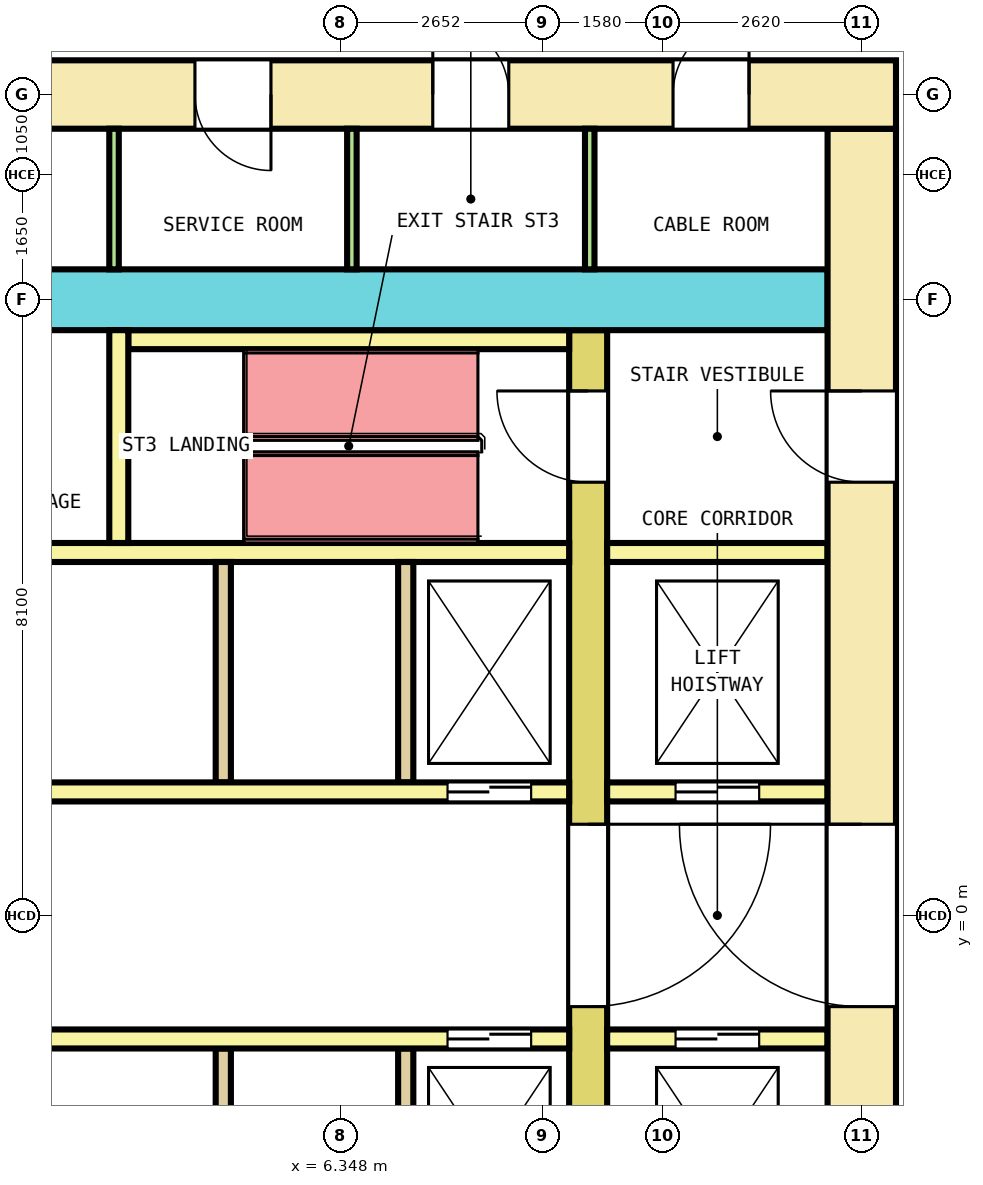
"""IFC4 building model, lengths in metres.
Left out: names, types, materials, properties, quantities, classifications, styles, units other than length and angle.
Written with IfcOpenShell. Run it as: python <this file> out.ifc"""

import sys

from ifc_helpers import new_model, si_unit, direction, frame, frame_2d, origin, place, context, subcontext, project, spatial, rectangle, extrude, element, fill, save


model = new_model("IFC4")
c1 = context("Model", 3, precision=1e-05, world=origin(), true_north=direction((0.0, 1.0)))
c2 = subcontext(c1, "Body", "Model", "MODEL_VIEW")
j1 = project(units=[si_unit("LENGTHUNIT", "METRE"), si_unit("PLANEANGLEUNIT", "RADIAN")], contexts=[c1])
p1 = place(None, origin())
s1 = spatial("IfcSite", under=j1, at=p1, CompositionType="ELEMENT")
p2 = place(p1, origin())
s2 = spatial("IfcBuilding", under=s1, at=p2, CompositionType="ELEMENT")
p3 = place(p2, frame((0.0, 0.0, 63.0)))
s3 = spatial("IfcBuildingStorey", under=s2, at=p3, CompositionType="ELEMENT", Elevation=63.0)
p4 = place(p3, frame((-13.65, 10.8, 0.0), z_axis=(0.0, 0.0, 1.0), x_axis=(1.0, 0.0, 0.0)))
e1 = element("IfcWall", 1, at=p4, inside=s3, PredefinedType="SHEAR", context=c2, shape_type="SweptSolid", body=[
    extrude(rectangle(XDim=27.3, YDim=0.9, at=frame_2d((13.65, 0.0))), origin(), (0.0, 0.0, 1.0), 4.1),
])
p5 = place(p4, frame((2.4, 0.0, 0.0)))
e2 = element("IfcOpeningElement", 2, at=p5, cuts=e1, PredefinedType="OPENING", context=c2, shape_type="SweptSolid", body=[
    extrude(rectangle(XDim=1.0, YDim=2.1, at=frame_2d((0.5, 1.05))), frame((0.0, 0.46, 0.0), z_axis=(0.0, -1.0, 0.0), x_axis=(1.0, 0.0, 0.0)), (0.0, 0.0, 1.0), 0.92),
])
p6 = place(p4, frame((6.494, 0.0, 0.0)))
e3 = element("IfcOpeningElement", 3, at=p6, cuts=e1, PredefinedType="OPENING", context=c2, shape_type="SweptSolid", body=[
    extrude(rectangle(XDim=1.0, YDim=2.1, at=frame_2d((0.5, 1.05))), frame((0.0, 0.46, 0.0), z_axis=(0.0, -1.0, 0.0), x_axis=(1.0, 0.0, 0.0)), (0.0, 0.0, 1.0), 0.92),
])
p7 = place(p4, frame((10.556, 0.0, 0.0)))
e4 = element("IfcOpeningElement", 4, at=p7, cuts=e1, PredefinedType="OPENING", context=c2, shape_type="SweptSolid", body=[
    extrude(rectangle(XDim=1.0, YDim=2.1, at=frame_2d((0.5, 1.05))), frame((0.0, 0.46, 0.0), z_axis=(0.0, -1.0, 0.0), x_axis=(1.0, 0.0, 0.0)), (0.0, 0.0, 1.0), 0.92),
])
p8 = place(p4, frame((18.077, 0.0, 0.0)))
e5 = element("IfcOpeningElement", 5, at=p8, cuts=e1, PredefinedType="OPENING", context=c2, shape_type="SweptSolid", body=[
    extrude(rectangle(XDim=1.0, YDim=2.1, at=frame_2d((0.5, 1.05))), frame((0.0, 0.46, 0.0), z_axis=(0.0, -1.0, 0.0), x_axis=(1.0, 0.0, 0.0)), (0.0, 0.0, 1.0), 0.92),
])
p9 = place(p4, frame((21.206, 0.0, 0.0)))
e6 = element("IfcOpeningElement", 6, at=p9, cuts=e1, PredefinedType="OPENING", context=c2, shape_type="SweptSolid", body=[
    extrude(rectangle(XDim=1.0, YDim=2.1, at=frame_2d((0.5, 1.05))), frame((0.0, 0.46, 0.0), z_axis=(0.0, -1.0, 0.0), x_axis=(1.0, 0.0, 0.0)), (0.0, 0.0, 1.0), 0.92),
])
p10 = place(p4, frame((24.367, 0.0, 0.0)))
e7 = element("IfcOpeningElement", 7, at=p10, cuts=e1, PredefinedType="OPENING", context=c2, shape_type="SweptSolid", body=[
    extrude(rectangle(XDim=1.0, YDim=2.1, at=frame_2d((0.5, 1.05))), frame((0.0, 0.46, 0.0), z_axis=(0.0, -1.0, 0.0), x_axis=(1.0, 0.0, 0.0)), (0.0, 0.0, 1.0), 0.92),
])
p11 = place(p4, frame((14.575, 0.0, 0.0)))
e8 = element("IfcOpeningElement", 8, at=p11, cuts=e1, PredefinedType="OPENING", context=c2, shape_type="SweptSolid", body=[
    extrude(rectangle(XDim=1.4, YDim=2.1, at=frame_2d((0.7, 1.05))), frame((0.0, 0.46, 0.0), z_axis=(0.0, -1.0, 0.0), x_axis=(1.0, 0.0, 0.0)), (0.0, 0.0, 1.0), 0.92),
])
p12 = place(p3, frame((13.2, -10.35, 0.0), z_axis=(0.0, 0.0, 1.0), x_axis=(0.0, 1.0, 0.0)))
e9 = element("IfcWall", 9, at=p12, inside=s3, PredefinedType="SHEAR", context=c2, shape_type="SweptSolid", body=[
    extrude(rectangle(XDim=20.7, YDim=0.9, at=frame_2d((10.35, 0.0))), origin(), (0.0, 0.0, 1.0), 4.1),
])
p13 = place(p12, frame((9.15, 0.0, 0.0)))
e10 = element("IfcOpeningElement", 10, at=p13, cuts=e9, PredefinedType="OPENING", context=c2, shape_type="SweptSolid", body=[
    extrude(rectangle(XDim=2.4, YDim=2.1, at=frame_2d((1.2, 1.05))), frame((0.0, 0.46, 0.0), z_axis=(0.0, -1.0, 0.0), x_axis=(1.0, 0.0, 0.0)), (0.0, 0.0, 1.0), 0.92),
])
p14 = place(p12, frame((16.05, 0.0, 0.0)))
e11 = element("IfcOpeningElement", 11, at=p14, cuts=e9, PredefinedType="OPENING", context=c2, shape_type="SweptSolid", body=[
    extrude(rectangle(XDim=1.2, YDim=2.1, at=frame_2d((0.6, 1.05))), frame((0.0, 0.46, 0.0), z_axis=(0.0, -1.0, 0.0), x_axis=(1.0, 0.0, 0.0)), (0.0, 0.0, 1.0), 0.92),
])
p15 = place(p12, frame((2.819, 0.0, 0.0)))
e12 = element("IfcOpeningElement", 12, at=p15, cuts=e9, PredefinedType="OPENING", context=c2, shape_type="SweptSolid", body=[
    extrude(rectangle(XDim=1.0, YDim=2.1, at=frame_2d((0.5, 1.05))), frame((0.0, 0.46, 0.0), z_axis=(0.0, -1.0, 0.0), x_axis=(1.0, 0.0, 0.0)), (0.0, 0.0, 1.0), 0.92),
])
p16 = place(p12, frame((4.281, 0.0, 0.0)))
e13 = element("IfcOpeningElement", 13, at=p16, cuts=e9, PredefinedType="OPENING", context=c2, shape_type="SweptSolid", body=[
    extrude(rectangle(XDim=1.0, YDim=2.1, at=frame_2d((0.5, 1.05))), frame((0.0, 0.46, 0.0), z_axis=(0.0, -1.0, 0.0), x_axis=(1.0, 0.0, 0.0)), (0.0, 0.0, 1.0), 0.92),
])
p17 = place(p3, frame((-12.75, 8.1, 0.0), z_axis=(0.0, 0.0, 1.0), x_axis=(1.0, 0.0, 0.0)))
e14 = element("IfcWall", 14, at=p17, inside=s3, PredefinedType="SHEAR", context=c2, shape_type="SweptSolid", body=[
    extrude(rectangle(XDim=25.5, YDim=0.8, at=frame_2d((12.75, 0.0))), origin(), (0.0, 0.0, 1.0), 4.1),
])
p18 = place(p17, frame((13.675, 0.0, 0.0)))
e15 = element("IfcOpeningElement", 15, at=p18, cuts=e14, PredefinedType="OPENING", context=c2, shape_type="SweptSolid", body=[
    extrude(rectangle(XDim=1.4, YDim=2.1, at=frame_2d((0.7, 1.05))), frame((0.0, 0.41, 0.0), z_axis=(0.0, -1.0, 0.0), x_axis=(1.0, 0.0, 0.0)), (0.0, 0.0, 1.0), 0.82),
])
p19 = place(p3, frame((9.6, -7.7, 0.0), z_axis=(0.0, 0.0, 1.0), x_axis=(0.0, 1.0, 0.0)))
e16 = element("IfcWall", 16, at=p19, inside=s3, PredefinedType="SHEAR", context=c2, shape_type="SweptSolid", body=[
    extrude(rectangle(XDim=15.4, YDim=0.5, at=frame_2d((7.7, 0.0))), origin(), (0.0, 0.0, 1.0), 4.1),
])
p20 = place(p19, frame((6.5, 0.0, 0.0)))
e17 = element("IfcOpeningElement", 17, at=p20, cuts=e16, PredefinedType="OPENING", context=c2, shape_type="SweptSolid", body=[
    extrude(rectangle(XDim=2.4, YDim=2.1, at=frame_2d((1.2, 1.05))), frame((0.0, 0.26, 0.0), z_axis=(0.0, -1.0, 0.0), x_axis=(1.0, 0.0, 0.0)), (0.0, 0.0, 1.0), 0.52),
])
p21 = place(p19, frame((13.4, 0.0, 0.0)))
e18 = element("IfcOpeningElement", 18, at=p21, cuts=e16, PredefinedType="OPENING", context=c2, shape_type="SweptSolid", body=[
    extrude(rectangle(XDim=1.2, YDim=2.1, at=frame_2d((0.6, 1.05))), frame((0.0, 0.26, 0.0), z_axis=(0.0, -1.0, 0.0), x_axis=(1.0, 0.0, 0.0)), (0.0, 0.0, 1.0), 0.52),
])
p22 = place(p19, frame((0.9, 0.0, 0.0)))
e19 = element("IfcOpeningElement", 19, at=p22, cuts=e16, PredefinedType="OPENING", context=c2, shape_type="SweptSolid", body=[
    extrude(rectangle(XDim=1.0, YDim=2.1, at=frame_2d((0.5, 1.05))), frame((0.0, 0.26, 0.0), z_axis=(0.0, -1.0, 0.0), x_axis=(1.0, 0.0, 0.0)), (0.0, 0.0, 1.0), 0.52),
])
p23 = place(p3, frame((-9.35, 1.625, 0.0), z_axis=(0.0, 0.0, 1.0), x_axis=(1.0, 0.0, 0.0)))
e20 = element("IfcWall", 20, at=p23, inside=s3, PredefinedType="SOLIDWALL", context=c2, shape_type="SweptSolid", body=[
    extrude(rectangle(XDim=18.7, YDim=0.25, at=frame_2d((9.35, 0.0))), origin(), (0.0, 0.0, 1.0), 4.1),
])
p24 = place(p23, frame((0.5, 0.0, 0.0)))
e21 = element("IfcOpeningElement", 21, at=p24, cuts=e20, PredefinedType="OPENING", context=c2, shape_type="SweptSolid", body=[
    extrude(rectangle(XDim=1.1, YDim=2.1, at=frame_2d((0.55, 1.05))), frame((0.0, 0.135, 0.0), z_axis=(0.0, -1.0, 0.0), x_axis=(1.0, 0.0, 0.0)), (0.0, 0.0, 1.0), 0.27),
])
p25 = place(p23, frame((17.1, 0.0, 0.0)))
e22 = element("IfcOpeningElement", 22, at=p25, cuts=e20, PredefinedType="OPENING", context=c2, shape_type="SweptSolid", body=[
    extrude(rectangle(XDim=1.1, YDim=2.1, at=frame_2d((0.55, 1.05))), frame((0.0, 0.135, 0.0), z_axis=(0.0, -1.0, 0.0), x_axis=(1.0, 0.0, 0.0)), (0.0, 0.0, 1.0), 0.27),
])
p26 = place(p3, frame((9.85, 1.625, 0.0), z_axis=(0.0, 0.0, 1.0), x_axis=(1.0, 0.0, 0.0)))
e23 = element("IfcWall", 23, at=p26, inside=s3, PredefinedType="SOLIDWALL", context=c2, shape_type="SweptSolid", body=[
    extrude(rectangle(XDim=2.9, YDim=0.25, at=frame_2d((1.45, 0.0))), origin(), (0.0, 0.0, 1.0), 4.1),
])
p27 = place(p26, frame((0.9, 0.0, 0.0)))
e24 = element("IfcOpeningElement", 24, at=p27, cuts=e23, PredefinedType="OPENING", context=c2, shape_type="SweptSolid", body=[
    extrude(rectangle(XDim=1.1, YDim=2.1, at=frame_2d((0.55, 1.05))), frame((0.0, 0.135, 0.0), z_axis=(0.0, -1.0, 0.0), x_axis=(1.0, 0.0, 0.0)), (0.0, 0.0, 1.0), 0.27),
])
p28 = place(p3, frame((-9.35, 4.775, 0.0), z_axis=(0.0, 0.0, 1.0), x_axis=(1.0, 0.0, 0.0)))
e25 = element("IfcWall", 25, at=p28, inside=s3, PredefinedType="SOLIDWALL", context=c2, shape_type="SweptSolid", body=[
    extrude(rectangle(XDim=18.7, YDim=0.25, at=frame_2d((9.35, 0.0))), origin(), (0.0, 0.0, 1.0), 4.1),
])
p29 = place(p3, frame((9.85, 4.775, 0.0), z_axis=(0.0, 0.0, 1.0), x_axis=(1.0, 0.0, 0.0)))
e26 = element("IfcWall", 26, at=p29, inside=s3, PredefinedType="SOLIDWALL", context=c2, shape_type="SweptSolid", body=[
    extrude(rectangle(XDim=2.9, YDim=0.25, at=frame_2d((1.45, 0.0))), origin(), (0.0, 0.0, 1.0), 4.1),
])
for number, where, z_axis, x_axis in (
    (27, (4.8, 1.75, 0.0), (0.0, 0.0, 1.0), (0.0, 1.0, 0.0)),
    (28, (7.2, 1.75, 0.0), (0.0, 0.0, 1.0), (0.0, 1.0, 0.0)),
):
    element("IfcWall", number, at=place(p3, frame(where, z_axis=z_axis, x_axis=x_axis)), inside=s3, PredefinedType="SOLIDWALL", context=c2, shape_type="SweptSolid", body=[
        extrude(rectangle(XDim=2.9, YDim=0.2, at=frame_2d((1.45, 0.0))), origin(), (0.0, 0.0, 1.0), 4.1),
    ])
p30 = place(p3, frame((-9.35, -1.625, 0.0), z_axis=(0.0, 0.0, 1.0), x_axis=(1.0, 0.0, 0.0)))
e29 = element("IfcWall", 29, at=p30, inside=s3, PredefinedType="SOLIDWALL", context=c2, shape_type="SweptSolid", body=[
    extrude(rectangle(XDim=18.7, YDim=0.25, at=frame_2d((9.35, 0.0))), origin(), (0.0, 0.0, 1.0), 4.1),
])
p31 = place(p30, frame((0.5, 0.0, 0.0)))
e30 = element("IfcOpeningElement", 30, at=p31, cuts=e29, PredefinedType="OPENING", context=c2, shape_type="SweptSolid", body=[
    extrude(rectangle(XDim=1.1, YDim=2.1, at=frame_2d((0.55, 1.05))), frame((0.0, 0.135, 0.0), z_axis=(0.0, -1.0, 0.0), x_axis=(1.0, 0.0, 0.0)), (0.0, 0.0, 1.0), 0.27),
])
p32 = place(p30, frame((17.1, 0.0, 0.0)))
e31 = element("IfcOpeningElement", 31, at=p32, cuts=e29, PredefinedType="OPENING", context=c2, shape_type="SweptSolid", body=[
    extrude(rectangle(XDim=1.1, YDim=2.1, at=frame_2d((0.55, 1.05))), frame((0.0, 0.135, 0.0), z_axis=(0.0, -1.0, 0.0), x_axis=(1.0, 0.0, 0.0)), (0.0, 0.0, 1.0), 0.27),
])
p33 = place(p3, frame((9.85, -1.625, 0.0), z_axis=(0.0, 0.0, 1.0), x_axis=(1.0, 0.0, 0.0)))
e32 = element("IfcWall", 32, at=p33, inside=s3, PredefinedType="SOLIDWALL", context=c2, shape_type="SweptSolid", body=[
    extrude(rectangle(XDim=2.9, YDim=0.25, at=frame_2d((1.45, 0.0))), origin(), (0.0, 0.0, 1.0), 4.1),
])
p34 = place(p33, frame((0.9, 0.0, 0.0)))
e33 = element("IfcOpeningElement", 33, at=p34, cuts=e32, PredefinedType="OPENING", context=c2, shape_type="SweptSolid", body=[
    extrude(rectangle(XDim=1.1, YDim=2.1, at=frame_2d((0.55, 1.05))), frame((0.0, 0.135, 0.0), z_axis=(0.0, -1.0, 0.0), x_axis=(1.0, 0.0, 0.0)), (0.0, 0.0, 1.0), 0.27),
])
for number, where, z_axis, x_axis in (
    (34, (4.8, -4.65, 0.0), (0.0, 0.0, 1.0), (0.0, 1.0, 0.0)),
    (35, (7.2, -4.65, 0.0), (0.0, 0.0, 1.0), (0.0, 1.0, 0.0)),
):
    element("IfcWall", number, at=place(p3, frame(where, z_axis=z_axis, x_axis=x_axis)), inside=s3, PredefinedType="SOLIDWALL", context=c2, shape_type="SweptSolid", body=[
        extrude(rectangle(XDim=2.9, YDim=0.2, at=frame_2d((1.45, 0.0))), origin(), (0.0, 0.0, 1.0), 4.1),
    ])
p35 = place(p3, frame((3.55, 7.575, 0.0), z_axis=(0.0, 0.0, 1.0), x_axis=(1.0, 0.0, 0.0)))
e36 = element("IfcWall", 36, at=p35, inside=s3, PredefinedType="SOLIDWALL", context=c2, shape_type="SweptSolid", body=[
    extrude(rectangle(XDim=5.8, YDim=0.25, at=frame_2d((2.9, 0.0))), origin(), (0.0, 0.0, 1.0), 4.1),
])
p36 = place(p3, frame((3.425, 4.9, 0.0), z_axis=(0.0, 0.0, 1.0), x_axis=(0.0, 1.0, 0.0)))
e37 = element("IfcWall", 37, at=p36, inside=s3, PredefinedType="SOLIDWALL", context=c2, shape_type="SweptSolid", body=[
    extrude(rectangle(XDim=2.8, YDim=0.25, at=frame_2d((1.4, 0.0))), origin(), (0.0, 0.0, 1.0), 4.1),
])
for number, where, z_axis, x_axis in (
    (38, (3.363, 8.5, 0.0), (0.0, 0.0, 1.0), (0.0, 1.0, 0.0)),
    (39, (6.492, 8.5, 0.0), (0.0, 0.0, 1.0), (0.0, 1.0, 0.0)),
    (40, (9.621, 8.5, 0.0), (0.0, 0.0, 1.0), (0.0, 1.0, 0.0)),
):
    element("IfcWall", number, at=place(p3, frame(where, z_axis=z_axis, x_axis=x_axis)), inside=s3, PredefinedType="PARTITIONING", context=c2, shape_type="SweptSolid", body=[
        extrude(rectangle(XDim=1.85, YDim=0.125, at=frame_2d((0.925, 0.0))), origin(), (0.0, 0.0, 1.0), 4.1),
    ])
p37 = place(p25, origin())
e41 = element("IfcDoor", 41, at=p37, inside=s3, OperationType="DOUBLE_DOOR_SLIDING", PredefinedType="DOOR", context=c2, shape_type="SweptSolid", body=[
    extrude(rectangle(XDim=1.1, YDim=2.1, at=frame_2d((0.55, 1.05))), frame((0.0, 0.075, 0.0), z_axis=(0.0, -1.0, 0.0), x_axis=(1.0, 0.0, 0.0)), (0.0, 0.0, 1.0), 0.15),
])
fill(e22, e41)
p38 = place(p27, origin())
e42 = element("IfcDoor", 42, at=p38, inside=s3, OperationType="DOUBLE_DOOR_SLIDING", PredefinedType="DOOR", context=c2, shape_type="SweptSolid", body=[
    extrude(rectangle(XDim=1.1, YDim=2.1, at=frame_2d((0.55, 1.05))), frame((0.0, 0.075, 0.0), z_axis=(0.0, -1.0, 0.0), x_axis=(1.0, 0.0, 0.0)), (0.0, 0.0, 1.0), 0.15),
])
fill(e24, e42)
p39 = place(p32, origin())
e43 = element("IfcDoor", 43, at=p39, inside=s3, OperationType="DOUBLE_DOOR_SLIDING", PredefinedType="DOOR", context=c2, shape_type="SweptSolid", body=[
    extrude(rectangle(XDim=1.1, YDim=2.1, at=frame_2d((0.55, 1.05))), frame((0.0, 0.075, 0.0), z_axis=(0.0, -1.0, 0.0), x_axis=(1.0, 0.0, 0.0)), (0.0, 0.0, 1.0), 0.15),
])
fill(e31, e43)
p40 = place(p34, origin())
e44 = element("IfcDoor", 44, at=p40, inside=s3, OperationType="DOUBLE_DOOR_SLIDING", PredefinedType="DOOR", context=c2, shape_type="SweptSolid", body=[
    extrude(rectangle(XDim=1.1, YDim=2.1, at=frame_2d((0.55, 1.05))), frame((0.0, 0.075, 0.0), z_axis=(0.0, -1.0, 0.0), x_axis=(1.0, 0.0, 0.0)), (0.0, 0.0, 1.0), 0.15),
])
fill(e33, e44)
p41 = place(p20, origin())
e45 = element("IfcDoor", 45, at=p41, inside=s3, OperationType="DOUBLE_DOOR_SINGLE_SWING", PredefinedType="DOOR", context=c2, shape_type="SweptSolid", body=[
    extrude(rectangle(XDim=2.4, YDim=2.1, at=frame_2d((1.2, 1.05))), frame((0.0, 0.2, 0.0), z_axis=(0.0, -1.0, 0.0), x_axis=(1.0, 0.0, 0.0)), (0.0, 0.0, 1.0), 0.4),
])
fill(e17, e45)
p42 = place(p13, origin())
e46 = element("IfcDoor", 46, at=p42, inside=s3, OperationType="DOUBLE_DOOR_SINGLE_SWING", PredefinedType="DOOR", context=c2, shape_type="SweptSolid", body=[
    extrude(rectangle(XDim=2.4, YDim=2.1, at=frame_2d((1.2, 1.05))), frame((0.0, 0.3, 0.0), z_axis=(0.0, -1.0, 0.0), x_axis=(1.0, 0.0, 0.0)), (0.0, 0.0, 1.0), 0.6),
])
fill(e10, e46)
p43 = place(p21, origin())
e47 = element("IfcDoor", 47, at=p43, inside=s3, OperationType="SINGLE_SWING_LEFT", PredefinedType="DOOR", context=c2, shape_type="SweptSolid", body=[
    extrude(rectangle(XDim=1.2, YDim=2.1, at=frame_2d((0.6, 1.05))), frame((0.0, 0.2, 0.0), z_axis=(0.0, -1.0, 0.0), x_axis=(1.0, 0.0, 0.0)), (0.0, 0.0, 1.0), 0.4),
])
fill(e18, e47)
p44 = place(p14, origin())
e48 = element("IfcDoor", 48, at=p44, inside=s3, OperationType="SINGLE_SWING_RIGHT", PredefinedType="DOOR", context=c2, shape_type="SweptSolid", body=[
    extrude(rectangle(XDim=1.2, YDim=2.1, at=frame_2d((0.6, 1.05))), frame((0.0, 0.3, 0.0), z_axis=(0.0, -1.0, 0.0), x_axis=(1.0, 0.0, 0.0)), (0.0, 0.0, 1.0), 0.6),
])
fill(e11, e48)
p45 = place(p8, origin())
e49 = element("IfcDoor", 49, at=p45, inside=s3, OperationType="SINGLE_SWING_LEFT", PredefinedType="DOOR", context=c2, shape_type="SweptSolid", body=[
    extrude(rectangle(XDim=1.0, YDim=2.1, at=frame_2d((0.5, 1.05))), frame((0.0, 0.3, 0.0), z_axis=(0.0, -1.0, 0.0), x_axis=(1.0, 0.0, 0.0)), (0.0, 0.0, 1.0), 0.6),
])
fill(e5, e49)
p46 = place(p9, origin())
e50 = element("IfcDoor", 50, at=p46, inside=s3, OperationType="SINGLE_SWING_RIGHT", PredefinedType="DOOR", context=c2, shape_type="SweptSolid", body=[
    extrude(rectangle(XDim=1.0, YDim=2.1, at=frame_2d((0.5, 1.05))), frame((0.0, 0.3, 0.0), z_axis=(0.0, -1.0, 0.0), x_axis=(1.0, 0.0, 0.0)), (0.0, 0.0, 1.0), 0.6),
])
fill(e6, e50)
p47 = place(p10, origin())
e51 = element("IfcDoor", 51, at=p47, inside=s3, OperationType="SINGLE_SWING_LEFT", PredefinedType="DOOR", context=c2, shape_type="SweptSolid", body=[
    extrude(rectangle(XDim=1.0, YDim=2.1, at=frame_2d((0.5, 1.05))), frame((0.0, 0.3, 0.0), z_axis=(0.0, -1.0, 0.0), x_axis=(1.0, 0.0, 0.0)), (0.0, 0.0, 1.0), 0.6),
])
fill(e7, e51)
save(model, sys.argv[1])
